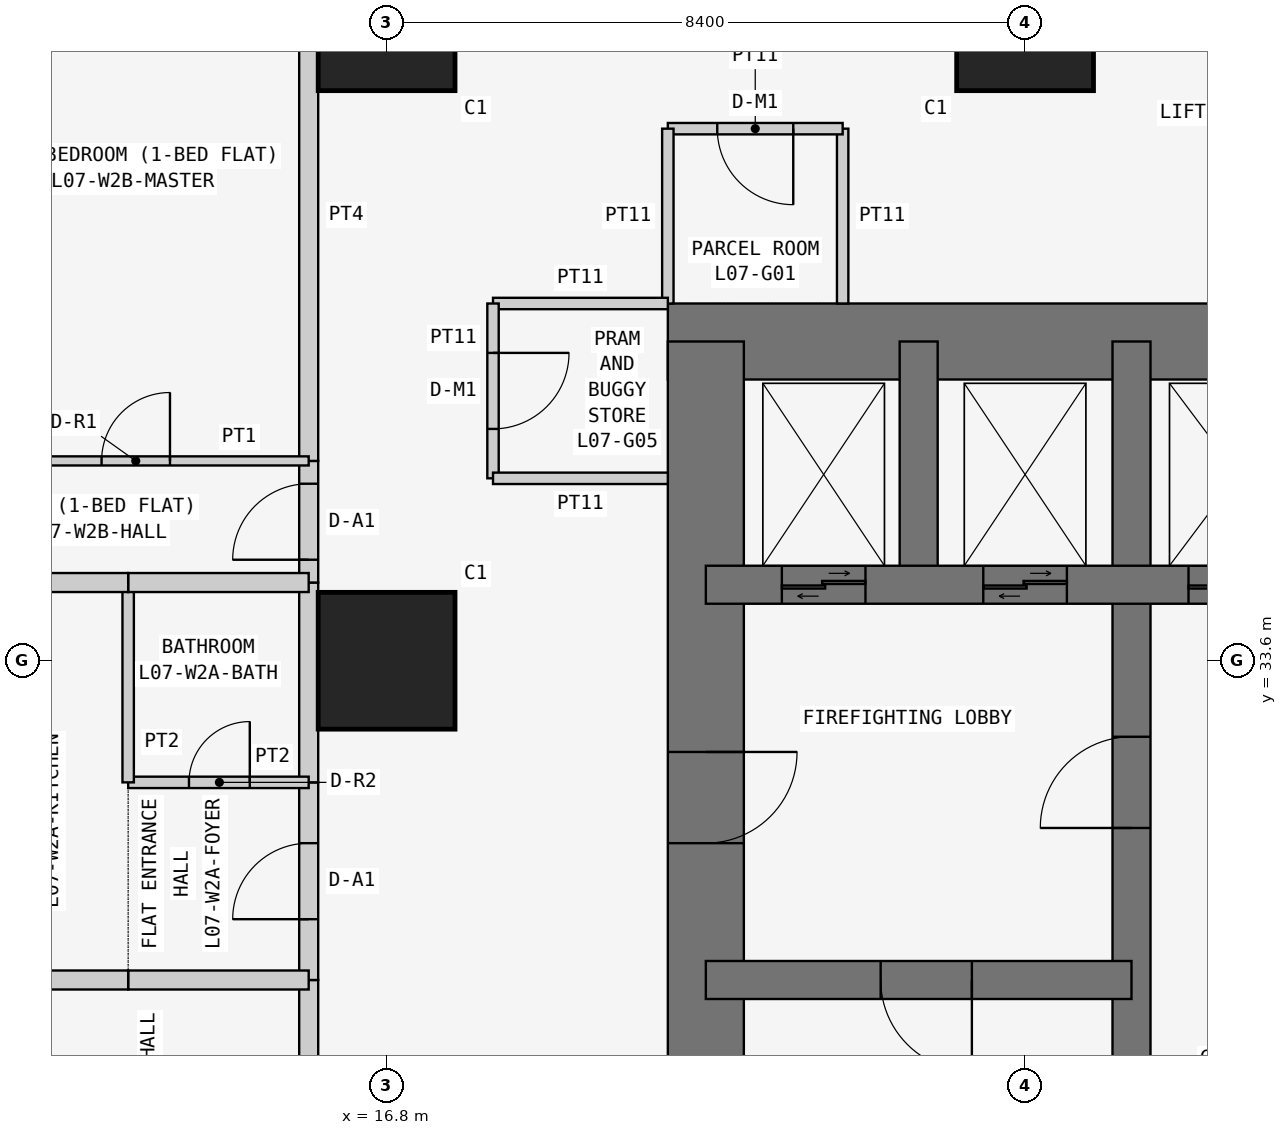
"""IFC4 building model, lengths in metres.
Left out: names, types, materials, properties, quantities, classifications, styles, units other than length and angle.
Written with IfcOpenShell. Run it as: python <this file> out.ifc"""

import sys

from ifc_helpers import new_model, si_unit, direction, frame, frame_2d, origin, origin_2d, place, context, subcontext, project, spatial, rectangle, extrude, element, fill, save


model = new_model("IFC4")
c1 = context("Model", 3, precision=1e-05, world=origin(), true_north=direction((0.0, 1.0)))
c2 = subcontext(c1, "Body", "Model", "MODEL_VIEW")
j1 = project(units=[si_unit("LENGTHUNIT", "METRE"), si_unit("PLANEANGLEUNIT", "RADIAN")], contexts=[c1])
p1 = place(None, origin())
s1 = spatial("IfcSite", under=j1, at=p1, CompositionType="ELEMENT")
p2 = place(p1, origin())
s2 = spatial("IfcBuilding", under=s1, at=p2, CompositionType="ELEMENT")
p3 = place(p2, frame((0.0, 0.0, 34.5)))
s3 = spatial("IfcBuildingStorey", under=s2, at=p3, CompositionType="ELEMENT", Elevation=34.5)
for number, where, z_axis, x_axis in (
    (1, (16.8, 33.6, 0.0), (0.0, 0.0, 1.0), (1.0, 0.0, 0.0)),
    (2, (16.8, 42.0, 0.0), (0.0, 0.0, 1.0), (1.0, 0.0, 0.0)),
    (3, (25.2, 42.0, 0.0), (0.0, 0.0, 1.0), (1.0, 0.0, 0.0)),
):
    element("IfcColumn", number, at=place(p3, frame(where, z_axis=z_axis, x_axis=x_axis)), inside=s3, PredefinedType="COLUMN", context=c2, shape_type="SweptSolid", body=[
        extrude(rectangle(XDim=1.8, YDim=1.8, at=origin_2d()), origin(), (0.0, 0.0, 1.0), 3.6),
    ])
p4 = place(p3, frame((37.8, 37.8, 0.0), z_axis=(0.0, 0.0, 1.0), x_axis=(-1.0, 0.0, 0.0)))
e4 = element("IfcWall", 4, at=p4, inside=s3, PredefinedType="SHEAR", context=c2, shape_type="SweptSolid", body=[
    extrude(rectangle(XDim=17.3, YDim=1.0, at=frame_2d((8.65, 0.0))), origin(), (0.0, 0.0, 1.0), 3.6),
])
p5 = place(p3, frame((21.0, 37.8, 0.0), z_axis=(0.0, 0.0, 1.0), x_axis=(0.0, -1.0, 0.0)))
e5 = element("IfcWall", 5, at=p5, inside=s3, PredefinedType="SHEAR", context=c2, shape_type="SweptSolid", body=[
    extrude(rectangle(XDim=17.3, YDim=1.0, at=frame_2d((8.65, 0.0))), origin(), (0.0, 0.0, 1.0), 3.6),
])
p6 = place(p5, frame((5.4, 0.0, 0.0)))
e6 = element("IfcOpeningElement", 6, at=p6, cuts=e5, PredefinedType="OPENING", context=c2, shape_type="SweptSolid", body=[
    extrude(rectangle(XDim=1.2, YDim=2.1, at=frame_2d((0.6, 1.05))), frame((0.0, 0.51, 0.0), z_axis=(0.0, -1.0, 0.0), x_axis=(1.0, 0.0, 0.0)), (0.0, 0.0, 1.0), 1.02),
])
p7 = place(p3, frame((26.6, 21.0, 0.0), z_axis=(0.0, 0.0, 1.0), x_axis=(0.0, 1.0, 0.0)))
e7 = element("IfcWall", 7, at=p7, inside=s3, PredefinedType="SHEAR", context=c2, shape_type="SweptSolid", body=[
    extrude(rectangle(XDim=16.8, YDim=0.5, at=frame_2d((8.4, 0.0))), origin(), (0.0, 0.0, 1.0), 3.6),
])
p8 = place(p7, frame((10.4, 0.0, 0.0)))
e8 = element("IfcOpeningElement", 8, at=p8, cuts=e7, PredefinedType="OPENING", context=c2, shape_type="SweptSolid", body=[
    extrude(rectangle(XDim=1.2, YDim=2.1, at=frame_2d((0.6, 1.05))), frame((0.0, 0.26, 0.0), z_axis=(0.0, -1.0, 0.0), x_axis=(1.0, 0.0, 0.0)), (0.0, 0.0, 1.0), 0.52),
])
p9 = place(p3, frame((21.0, 29.4, 0.0), z_axis=(0.0, 0.0, 1.0), x_axis=(1.0, 0.0, 0.0)))
e9 = element("IfcWall", 9, at=p9, inside=s3, PredefinedType="SHEAR", context=c2, shape_type="SweptSolid", body=[
    extrude(rectangle(XDim=5.6, YDim=0.5, at=frame_2d((2.8, 0.0))), origin(), (0.0, 0.0, 1.0), 3.6),
])
p10 = place(p9, frame((2.3, 0.0, 0.0)))
e10 = element("IfcOpeningElement", 10, at=p10, cuts=e9, PredefinedType="OPENING", context=c2, shape_type="SweptSolid", body=[
    extrude(rectangle(XDim=1.2, YDim=2.1, at=frame_2d((0.6, 1.05))), frame((0.0, 0.26, 0.0), z_axis=(0.0, -1.0, 0.0), x_axis=(1.0, 0.0, 0.0)), (0.0, 0.0, 1.0), 0.52),
])
p11 = place(p3, frame((21.0, 34.6, 0.0), z_axis=(0.0, 0.0, 1.0), x_axis=(1.0, 0.0, 0.0)))
e11 = element("IfcWall", 11, at=p11, inside=s3, PredefinedType="SHEAR", context=c2, shape_type="SweptSolid", body=[
    extrude(rectangle(XDim=11.2, YDim=0.5, at=frame_2d((5.6, 0.0))), origin(), (0.0, 0.0, 1.0), 3.6),
])
p12 = place(p11, frame((9.35, 0.0, 0.0)))
e12 = element("IfcOpeningElement", 12, at=p12, cuts=e11, PredefinedType="OPENING", context=c2, shape_type="SweptSolid", body=[
    extrude(rectangle(XDim=0.9, YDim=2.1, at=frame_2d((0.45, 1.05))), frame((0.0, 0.26, 0.0), z_axis=(0.0, -1.0, 0.0), x_axis=(1.0, 0.0, 0.0)), (0.0, 0.0, 1.0), 0.52),
])
p13 = place(p11, frame((1.0, 0.0, 0.0)))
e13 = element("IfcOpeningElement", 13, at=p13, cuts=e11, PredefinedType="OPENING", context=c2, shape_type="SweptSolid", body=[
    extrude(rectangle(XDim=1.1, YDim=2.1, at=frame_2d((0.55, 1.05))), frame((0.0, 0.26, 0.0), z_axis=(0.0, -1.0, 0.0), x_axis=(1.0, 0.0, 0.0)), (0.0, 0.0, 1.0), 0.52),
])
p14 = place(p11, frame((3.65, 0.0, 0.0)))
e14 = element("IfcOpeningElement", 14, at=p14, cuts=e11, PredefinedType="OPENING", context=c2, shape_type="SweptSolid", body=[
    extrude(rectangle(XDim=1.1, YDim=2.1, at=frame_2d((0.55, 1.05))), frame((0.0, 0.26, 0.0), z_axis=(0.0, -1.0, 0.0), x_axis=(1.0, 0.0, 0.0)), (0.0, 0.0, 1.0), 0.52),
])
p15 = place(p11, frame((6.35, 0.0, 0.0)))
e15 = element("IfcOpeningElement", 15, at=p15, cuts=e11, PredefinedType="OPENING", context=c2, shape_type="SweptSolid", body=[
    extrude(rectangle(XDim=1.3, YDim=2.1, at=frame_2d((0.65, 1.05))), frame((0.0, 0.26, 0.0), z_axis=(0.0, -1.0, 0.0), x_axis=(1.0, 0.0, 0.0)), (0.0, 0.0, 1.0), 0.52),
])
p16 = place(p3, frame((23.8, 34.6, 0.0), z_axis=(0.0, 0.0, 1.0), x_axis=(0.0, 1.0, 0.0)))
e16 = element("IfcWall", 16, at=p16, inside=s3, PredefinedType="SHEAR", context=c2, shape_type="SweptSolid", body=[
    extrude(rectangle(XDim=3.2, YDim=0.5, at=frame_2d((1.6, 0.0))), origin(), (0.0, 0.0, 1.0), 3.6),
])
p17 = place(p3, frame((22.8, 38.3, 0.0), z_axis=(0.0, 0.0, 1.0), x_axis=(0.0, 1.0, 0.0)))
e17 = element("IfcWall", 17, at=p17, inside=s3, PredefinedType="PARTITIONING", context=c2, shape_type="SweptSolid", body=[
    extrude(rectangle(XDim=2.3, YDim=0.15, at=frame_2d((1.15, 0.0))), origin(), (0.0, 0.0, 1.0), 3.45),
])
p18 = place(p3, frame((22.8, 40.6, 0.0), z_axis=(0.0, 0.0, 1.0), x_axis=(-1.0, 0.0, 0.0)))
e18 = element("IfcWall", 18, at=p18, inside=s3, PredefinedType="PARTITIONING", context=c2, shape_type="SweptSolid", body=[
    extrude(rectangle(XDim=2.3, YDim=0.15, at=frame_2d((1.15, 0.0))), origin(), (0.0, 0.0, 1.0), 3.45),
])
p19 = place(p18, frame((0.65, 0.0, 0.0)))
e19 = element("IfcOpeningElement", 19, at=p19, cuts=e18, PredefinedType="OPENING", context=c2, shape_type="SweptSolid", body=[
    extrude(rectangle(XDim=1.0, YDim=2.1, at=frame_2d((0.5, 1.05))), frame((0.0, 0.085, 0.0), z_axis=(0.0, -1.0, 0.0), x_axis=(1.0, 0.0, 0.0)), (0.0, 0.0, 1.0), 0.17),
])
for number, where, z_axis, x_axis in (
    (20, (20.5, 40.6, 0.0), (0.0, 0.0, 1.0), (0.0, -1.0, 0.0)),
    (21, (20.5, 38.3, 0.0), (0.0, 0.0, 1.0), (-1.0, 0.0, 0.0)),
):
    element("IfcWall", number, at=place(p3, frame(where, z_axis=z_axis, x_axis=x_axis)), inside=s3, PredefinedType="PARTITIONING", context=c2, shape_type="SweptSolid", body=[
        extrude(rectangle(XDim=2.3, YDim=0.15, at=frame_2d((1.15, 0.0))), origin(), (0.0, 0.0, 1.0), 3.45),
    ])
p20 = place(p3, frame((18.2, 38.3, 0.0), z_axis=(0.0, 0.0, 1.0), x_axis=(0.0, -1.0, 0.0)))
e22 = element("IfcWall", 22, at=p20, inside=s3, PredefinedType="PARTITIONING", context=c2, shape_type="SweptSolid", body=[
    extrude(rectangle(XDim=2.3, YDim=0.15, at=frame_2d((1.15, 0.0))), origin(), (0.0, 0.0, 1.0), 3.45),
])
p21 = place(p20, frame((0.65, 0.0, 0.0)))
e23 = element("IfcOpeningElement", 23, at=p21, cuts=e22, PredefinedType="OPENING", context=c2, shape_type="SweptSolid", body=[
    extrude(rectangle(XDim=1.0, YDim=2.1, at=frame_2d((0.5, 1.05))), frame((0.0, 0.085, 0.0), z_axis=(0.0, -1.0, 0.0), x_axis=(1.0, 0.0, 0.0)), (0.0, 0.0, 1.0), 0.17),
])
p22 = place(p3, frame((18.2, 36.0, 0.0), z_axis=(0.0, 0.0, 1.0), x_axis=(1.0, 0.0, 0.0)))
e24 = element("IfcWall", 24, at=p22, inside=s3, PredefinedType="PARTITIONING", context=c2, shape_type="SweptSolid", body=[
    extrude(rectangle(XDim=2.3, YDim=0.15, at=frame_2d((1.15, 0.0))), origin(), (0.0, 0.0, 1.0), 3.45),
])
p23 = place(p3, frame((15.775, 24.171, 0.0), z_axis=(0.0, 0.0, 1.0), x_axis=(0.0, 1.0, 0.0)))
e25 = element("IfcWall", 25, at=p23, inside=s3, PredefinedType="PARTITIONING", context=c2, shape_type="SweptSolid", body=[
    extrude(rectangle(XDim=5.229, YDim=0.25, at=frame_2d((2.615, 0.0))), origin(), (0.0, 0.0, 1.0), 3.45),
])
p24 = place(p23, frame((2.129, 0.0, 0.0)))
e26 = element("IfcOpeningElement", 26, at=p24, cuts=e25, PredefinedType="OPENING", context=c2, shape_type="SweptSolid", body=[
    extrude(rectangle(XDim=1.0, YDim=2.1, at=frame_2d((0.5, 1.05))), frame((0.0, 0.135, 0.0), z_axis=(0.0, -1.0, 0.0), x_axis=(1.0, 0.0, 0.0)), (0.0, 0.0, 1.0), 0.27),
])
p25 = place(p3, frame((15.775, 29.4, 0.0), z_axis=(0.0, 0.0, 1.0), x_axis=(0.0, 1.0, 0.0)))
e27 = element("IfcWall", 27, at=p25, inside=s3, PredefinedType="PARTITIONING", context=c2, shape_type="SweptSolid", body=[
    extrude(rectangle(XDim=2.6, YDim=0.25, at=frame_2d((1.3, 0.0))), origin(), (0.0, 0.0, 1.0), 3.45),
])
p26 = place(p25, frame((0.8, 0.0, 0.0)))
e28 = element("IfcOpeningElement", 28, at=p26, cuts=e27, PredefinedType="OPENING", context=c2, shape_type="SweptSolid", body=[
    extrude(rectangle(XDim=1.0, YDim=2.1, at=frame_2d((0.5, 1.05))), frame((0.0, 0.135, 0.0), z_axis=(0.0, -1.0, 0.0), x_axis=(1.0, 0.0, 0.0)), (0.0, 0.0, 1.0), 0.27),
])
p27 = place(p3, frame((15.775, 32.0, 0.0), z_axis=(0.0, 0.0, 1.0), x_axis=(0.0, 1.0, 0.0)))
e29 = element("IfcWall", 29, at=p27, inside=s3, PredefinedType="PARTITIONING", context=c2, shape_type="SweptSolid", body=[
    extrude(rectangle(XDim=2.629, YDim=0.25, at=frame_2d((1.314, 0.0))), origin(), (0.0, 0.0, 1.0), 3.45),
])
p28 = place(p3, frame((15.775, 34.629, 0.0), z_axis=(0.0, 0.0, 1.0), x_axis=(0.0, 1.0, 0.0)))
e30 = element("IfcWall", 30, at=p28, inside=s3, PredefinedType="PARTITIONING", context=c2, shape_type="SweptSolid", body=[
    extrude(rectangle(XDim=1.6, YDim=0.25, at=frame_2d((0.8, 0.0))), origin(), (0.0, 0.0, 1.0), 3.45),
])
p29 = place(p28, frame((0.3, 0.0, 0.0)))
e31 = element("IfcOpeningElement", 31, at=p29, cuts=e30, PredefinedType="OPENING", context=c2, shape_type="SweptSolid", body=[
    extrude(rectangle(XDim=1.0, YDim=2.1, at=frame_2d((0.5, 1.05))), frame((0.0, 0.135, 0.0), z_axis=(0.0, -1.0, 0.0), x_axis=(1.0, 0.0, 0.0)), (0.0, 0.0, 1.0), 0.27),
])
p30 = place(p3, frame((15.775, 36.229, 0.0), z_axis=(0.0, 0.0, 1.0), x_axis=(0.0, 1.0, 0.0)))
e32 = element("IfcWall", 32, at=p30, inside=s3, PredefinedType="PARTITIONING", context=c2, shape_type="SweptSolid", body=[
    extrude(rectangle(XDim=6.471, YDim=0.25, at=frame_2d((3.235, 0.0))), origin(), (0.0, 0.0, 1.0), 3.45),
])
p31 = place(p3, frame((15.775, 29.4, 0.0), z_axis=(0.0, 0.0, 1.0), x_axis=(-1.0, 0.0, 0.0)))
e33 = element("IfcWall", 33, at=p31, inside=s3, PredefinedType="PARTITIONING", context=c2, shape_type="SweptSolid", body=[
    extrude(rectangle(XDim=2.375, YDim=0.25, at=frame_2d((1.188, 0.0))), origin(), (0.0, 0.0, 1.0), 3.45),
])
p32 = place(p3, frame((13.4, 29.4, 0.0), z_axis=(0.0, 0.0, 1.0), x_axis=(-1.0, 0.0, 0.0)))
e34 = element("IfcWall", 34, at=p32, inside=s3, PredefinedType="PARTITIONING", context=c2, shape_type="SweptSolid", body=[
    extrude(rectangle(XDim=1.2, YDim=0.25, at=frame_2d((0.6, 0.0))), origin(), (0.0, 0.0, 1.0), 3.45),
])
p33 = place(p3, frame((13.4, 32.0, 0.0), z_axis=(0.0, 0.0, 1.0), x_axis=(1.0, 0.0, 0.0)))
e35 = element("IfcWall", 35, at=p33, inside=s3, PredefinedType="PARTITIONING", context=c2, shape_type="SweptSolid", body=[
    extrude(rectangle(XDim=2.375, YDim=0.15, at=frame_2d((1.188, 0.0))), origin(), (0.0, 0.0, 1.0), 3.45),
])
p34 = place(p33, frame((0.8, 0.0, 0.0)))
e36 = element("IfcOpeningElement", 36, at=p34, cuts=e35, PredefinedType="OPENING", context=c2, shape_type="SweptSolid", body=[
    extrude(rectangle(XDim=0.8, YDim=2.1, at=frame_2d((0.4, 1.05))), frame((0.0, 0.085, 0.0), z_axis=(0.0, -1.0, 0.0), x_axis=(1.0, 0.0, 0.0)), (0.0, 0.0, 1.0), 0.17),
])
p35 = place(p3, frame((13.4, 32.0, 0.0), z_axis=(0.0, 0.0, 1.0), x_axis=(0.0, 1.0, 0.0)))
e37 = element("IfcWall", 37, at=p35, inside=s3, PredefinedType="PARTITIONING", context=c2, shape_type="SweptSolid", body=[
    extrude(rectangle(XDim=2.629, YDim=0.15, at=frame_2d((1.314, 0.0))), origin(), (0.0, 0.0, 1.0), 3.45),
])
p36 = place(p3, frame((13.4, 34.629, 0.0), z_axis=(0.0, 0.0, 1.0), x_axis=(1.0, 0.0, 0.0)))
e38 = element("IfcWall", 38, at=p36, inside=s3, PredefinedType="PARTITIONING", context=c2, shape_type="SweptSolid", body=[
    extrude(rectangle(XDim=2.375, YDim=0.25, at=frame_2d((1.188, 0.0))), origin(), (0.0, 0.0, 1.0), 3.45),
])
p37 = place(p3, frame((11.0, 34.629, 0.0), z_axis=(0.0, 0.0, 1.0), x_axis=(1.0, 0.0, 0.0)))
e39 = element("IfcWall", 39, at=p37, inside=s3, PredefinedType="PARTITIONING", context=c2, shape_type="SweptSolid", body=[
    extrude(rectangle(XDim=2.4, YDim=0.25, at=frame_2d((1.2, 0.0))), origin(), (0.0, 0.0, 1.0), 3.45),
])
p38 = place(p3, frame((11.2, 36.229, 0.0), z_axis=(0.0, 0.0, 1.0), x_axis=(1.0, 0.0, 0.0)))
e40 = element("IfcWall", 40, at=p38, inside=s3, PredefinedType="PARTITIONING", context=c2, shape_type="SweptSolid", body=[
    extrude(rectangle(XDim=4.575, YDim=0.12, at=frame_2d((2.288, 0.0))), origin(), (0.0, 0.0, 1.0), 3.45),
])
p39 = place(p38, frame((1.85, 0.0, 0.0)))
e41 = element("IfcOpeningElement", 41, at=p39, cuts=e40, PredefinedType="OPENING", context=c2, shape_type="SweptSolid", body=[
    extrude(rectangle(XDim=0.9, YDim=2.1, at=frame_2d((0.45, 1.05))), frame((0.0, 0.07, 0.0), z_axis=(0.0, -1.0, 0.0), x_axis=(1.0, 0.0, 0.0)), (0.0, 0.0, 1.0), 0.14),
])
p40 = place(p19, origin())
e42 = element("IfcDoor", 42, at=p40, inside=s3, OperationType="SINGLE_SWING_LEFT", PredefinedType="DOOR", context=c2, shape_type="SweptSolid", body=[
    extrude(rectangle(XDim=1.0, YDim=2.1, at=frame_2d((0.5, 1.05))), frame((0.0, 0.025, 0.0), z_axis=(0.0, -1.0, 0.0), x_axis=(1.0, 0.0, 0.0)), (0.0, 0.0, 1.0), 0.05),
])
fill(e19, e42)
p41 = place(p21, origin())
e43 = element("IfcDoor", 43, at=p41, inside=s3, OperationType="SINGLE_SWING_LEFT", PredefinedType="DOOR", context=c2, shape_type="SweptSolid", body=[
    extrude(rectangle(XDim=1.0, YDim=2.1, at=frame_2d((0.5, 1.05))), frame((0.0, 0.025, 0.0), z_axis=(0.0, -1.0, 0.0), x_axis=(1.0, 0.0, 0.0)), (0.0, 0.0, 1.0), 0.05),
])
fill(e23, e43)
p42 = place(p26, origin())
e44 = element("IfcDoor", 44, at=p42, inside=s3, OperationType="SINGLE_SWING_LEFT", PredefinedType="DOOR", context=c2, shape_type="SweptSolid", body=[
    extrude(rectangle(XDim=1.0, YDim=2.1, at=frame_2d((0.5, 1.05))), frame((0.0, 0.025, 0.0), z_axis=(0.0, -1.0, 0.0), x_axis=(1.0, 0.0, 0.0)), (0.0, 0.0, 1.0), 0.05),
])
fill(e28, e44)
p43 = place(p34, origin())
e45 = element("IfcDoor", 45, at=p43, inside=s3, OperationType="SINGLE_SWING_RIGHT", PredefinedType="DOOR", context=c2, shape_type="SweptSolid", body=[
    extrude(rectangle(XDim=0.8, YDim=2.1, at=frame_2d((0.4, 1.05))), frame((0.0, 0.025, 0.0), z_axis=(0.0, -1.0, 0.0), x_axis=(1.0, 0.0, 0.0)), (0.0, 0.0, 1.0), 0.05),
])
fill(e36, e45)
p44 = place(p29, origin())
e46 = element("IfcDoor", 46, at=p44, inside=s3, OperationType="SINGLE_SWING_LEFT", PredefinedType="DOOR", context=c2, shape_type="SweptSolid", body=[
    extrude(rectangle(XDim=1.0, YDim=2.1, at=frame_2d((0.5, 1.05))), frame((0.0, 0.025, 0.0), z_axis=(0.0, -1.0, 0.0), x_axis=(1.0, 0.0, 0.0)), (0.0, 0.0, 1.0), 0.05),
])
fill(e31, e46)
p45 = place(p39, origin())
e47 = element("IfcDoor", 47, at=p45, inside=s3, OperationType="SINGLE_SWING_RIGHT", PredefinedType="DOOR", context=c2, shape_type="SweptSolid", body=[
    extrude(rectangle(XDim=0.9, YDim=2.1, at=frame_2d((0.45, 1.05))), frame((0.0, 0.025, 0.0), z_axis=(0.0, -1.0, 0.0), x_axis=(1.0, 0.0, 0.0)), (0.0, 0.0, 1.0), 0.05),
])
fill(e41, e47)
p46 = place(p6, origin())
e48 = element("IfcDoor", 48, at=p46, inside=s3, OperationType="SINGLE_SWING_LEFT", PredefinedType="DOOR", context=c2, shape_type="SweptSolid", body=[
    extrude(rectangle(XDim=1.2, YDim=2.1, at=frame_2d((0.6, 1.05))), frame((0.0, 0.025, 0.0), z_axis=(0.0, -1.0, 0.0), x_axis=(1.0, 0.0, 0.0)), (0.0, 0.0, 1.0), 0.05),
])
fill(e6, e48)
p47 = place(p10, frame((1.2, 0.0, 0.0), z_axis=(0.0, 0.0, 1.0), x_axis=(-1.0, 0.0, 0.0)))
e49 = element("IfcDoor", 49, at=p47, inside=s3, OperationType="SINGLE_SWING_LEFT", PredefinedType="DOOR", context=c2, shape_type="SweptSolid", body=[
    extrude(rectangle(XDim=1.2, YDim=2.1, at=frame_2d((0.6, 1.05))), frame((0.0, 0.025, 0.0), z_axis=(0.0, -1.0, 0.0), x_axis=(1.0, 0.0, 0.0)), (0.0, 0.0, 1.0), 0.05),
])
fill(e10, e49)
p48 = place(p8, origin())
e50 = element("IfcDoor", 50, at=p48, inside=s3, OperationType="SINGLE_SWING_LEFT", PredefinedType="DOOR", context=c2, shape_type="SweptSolid", body=[
    extrude(rectangle(XDim=1.2, YDim=2.1, at=frame_2d((0.6, 1.05))), frame((0.0, 0.025, 0.0), z_axis=(0.0, -1.0, 0.0), x_axis=(1.0, 0.0, 0.0)), (0.0, 0.0, 1.0), 0.05),
])
fill(e8, e50)
p49 = place(p13, origin())
e51 = element("IfcDoor", 51, at=p49, inside=s3, OperationType="DOUBLE_DOOR_SLIDING", PredefinedType="DOOR", context=c2, shape_type="SweptSolid", body=[
    extrude(rectangle(XDim=1.1, YDim=2.1, at=frame_2d((0.55, 1.05))), frame((0.0, 0.025, 0.0), z_axis=(0.0, -1.0, 0.0), x_axis=(1.0, 0.0, 0.0)), (0.0, 0.0, 1.0), 0.05),
])
fill(e13, e51)
p50 = place(p14, origin())
e52 = element("IfcDoor", 52, at=p50, inside=s3, OperationType="DOUBLE_DOOR_SLIDING", PredefinedType="DOOR", context=c2, shape_type="SweptSolid", body=[
    extrude(rectangle(XDim=1.1, YDim=2.1, at=frame_2d((0.55, 1.05))), frame((0.0, 0.025, 0.0), z_axis=(0.0, -1.0, 0.0), x_axis=(1.0, 0.0, 0.0)), (0.0, 0.0, 1.0), 0.05),
])
fill(e14, e52)
p51 = place(p15, origin())
e53 = element("IfcDoor", 53, at=p51, inside=s3, OperationType="DOUBLE_DOOR_SLIDING", PredefinedType="DOOR", context=c2, shape_type="SweptSolid", body=[
    extrude(rectangle(XDim=1.3, YDim=2.1, at=frame_2d((0.65, 1.05))), frame((0.0, 0.025, 0.0), z_axis=(0.0, -1.0, 0.0), x_axis=(1.0, 0.0, 0.0)), (0.0, 0.0, 1.0), 0.05),
])
fill(e15, e53)
save(model, sys.argv[1])
